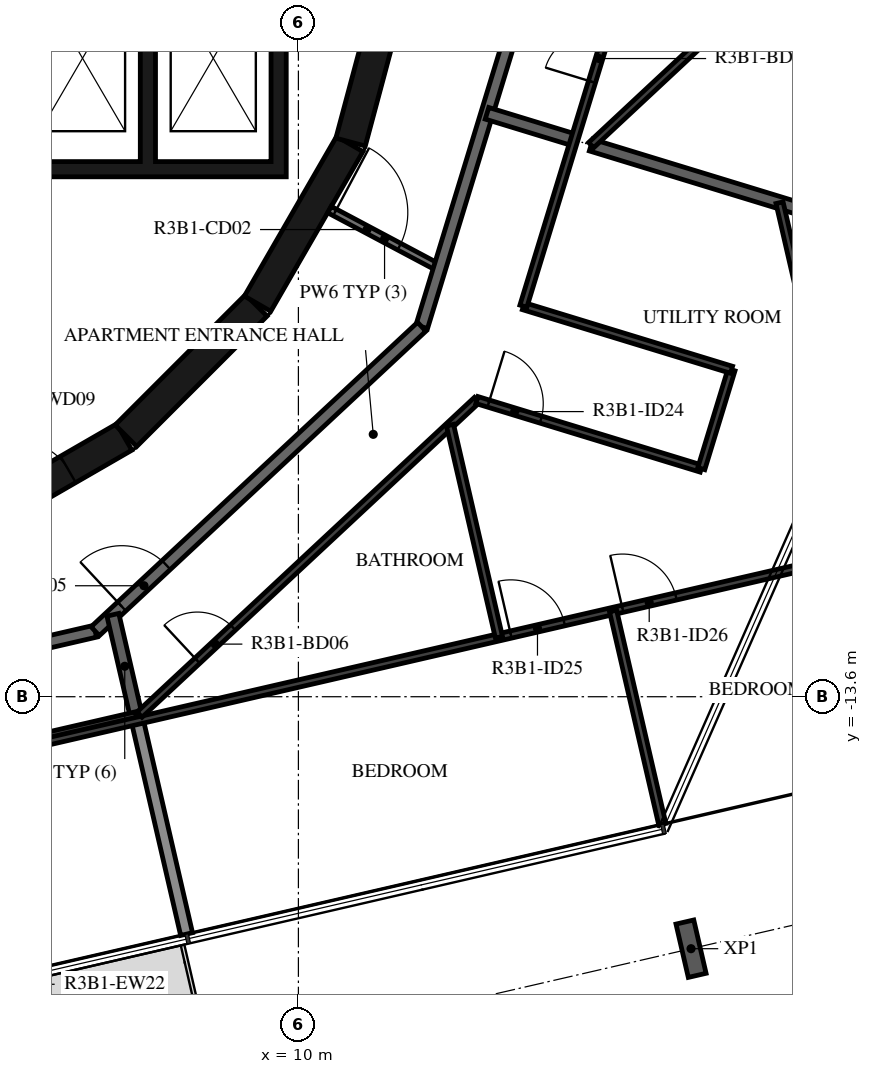
"""IFC4 building model, lengths in metres.
Left out: names, types, materials, properties, quantities, classifications, styles, units other than length and angle.
Written with IfcOpenShell. Run it as: python <this file> out.ifc"""

import sys

from ifc_helpers import new_model, si_unit, direction, frame, frame_2d, origin, origin_2d, place, context, subcontext, project, spatial, polyline, rectangle, i_section, outline, extrude, element, fill, save


model = new_model("IFC4")
c1 = context("Model", 3, precision=1e-05, world=origin(), true_north=direction((0.0, 1.0)))
c2 = subcontext(c1, "Body", "Model", "MODEL_VIEW")
j1 = project(units=[si_unit("LENGTHUNIT", "METRE"), si_unit("PLANEANGLEUNIT", "RADIAN")], contexts=[c1])
p1 = place(None, origin())
s1 = spatial("IfcSite", under=j1, at=p1, CompositionType="ELEMENT")
p2 = place(p1, origin())
s2 = spatial("IfcBuilding", under=s1, at=p2, CompositionType="ELEMENT")
p3 = place(p2, frame((0.0, 0.0, 123.9)))
s3 = spatial("IfcBuildingStorey", under=s2, at=p3, CompositionType="ELEMENT", Elevation=123.9)
p4 = place(p3, frame((16.457, -17.744, -0.38), z_axis=(0.0, 0.0, 1.0), x_axis=(-0.974370073419, -0.224951016948, 0.0)))
e1 = element("IfcColumn", 1, at=p4, inside=s3, PredefinedType="COLUMN", context=c2, shape_type="SweptSolid", body=[
    extrude(i_section(OverallWidth=0.3, OverallDepth=0.9, WebThickness=0.019, FlangeThickness=0.035, FilletRadius=0.03, at=origin_2d()), origin(), (0.0, 0.0, 1.0), 3.5),
])
p5 = place(p3, frame((4.51, -10.845, 0.0), z_axis=(0.0, 0.0, 1.0), x_axis=(0.865975092491, 0.500087131594, 0.0)))
e2 = element("IfcWall", 2, at=p5, inside=s3, PredefinedType="SHEAR", context=c2, shape_type="SweptSolid", body=[
    extrude(rectangle(XDim=3.033, YDim=0.5, at=frame_2d((1.516, 0.0))), origin(), (0.0, 0.0, 1.0), 3.12),
])
p6 = place(p5, frame((1.066, 0.0, 0.0)))
e3 = element("IfcOpeningElement", 3, at=p6, cuts=e2, PredefinedType="OPENING", context=c2, shape_type="SweptSolid", body=[
    extrude(rectangle(XDim=0.9, YDim=2.1, at=frame_2d((0.45, 1.05))), frame((0.0, 0.26, 0.0), z_axis=(0.0, -1.0, 0.0), x_axis=(1.0, 0.0, 0.0)), (0.0, 0.0, 1.0), 0.52),
])
p7 = place(p3, frame((7.164, -9.308, 0.0), z_axis=(0.0, 0.0, 1.0), x_axis=(0.707106781187, 0.707106781187, 0.0)))
e4 = element("IfcWall", 4, at=p7, inside=s3, PredefinedType="SHEAR", context=c2, shape_type="SweptSolid", body=[
    extrude(rectangle(XDim=3.032, YDim=0.5, at=frame_2d((1.516, 0.0))), origin(), (0.0, 0.0, 1.0), 3.12),
])
for number, where, z_axis, x_axis in (
    (5, (9.329, -7.137, 0.0), (0.0, 0.0, 1.0), (0.5, 0.866, 0.0)),
    (6, (10.858, -4.479, 0.0), (0.0, 0.0, 1.0), (0.259, 0.966, 0.0)),
):
    element("IfcWall", number, at=place(p3, frame(where, z_axis=z_axis, x_axis=x_axis)), inside=s3, PredefinedType="SHEAR", context=c2, shape_type="SweptSolid", body=[
        extrude(rectangle(XDim=3.033, YDim=0.5, at=frame_2d((1.516, 0.0))), origin(), (0.0, 0.0, 1.0), 3.12),
    ])
p8 = place(p3, origin())
e7 = element("IfcWall", 7, at=p8, inside=s3, PredefinedType="SHEAR", context=c2, shape_type="SweptSolid", body=[
    extrude(outline(polyline([(9.8, -5.05), (9.8, -4.8), (9.8, -1.9), (9.55, -1.9), (9.55, -4.8), (7.65, -4.8), (7.65, -1.9), (7.4, -1.9), (7.4, -4.8), (5.5, -4.8), (5.5, -1.9), (5.25, -1.9), (5.25, -4.8), (3.35, -4.8), (3.35, -1.9), (3.1, -1.9), (3.1, -4.8), (1.2, -4.8), (1.2, -1.9), (0.95, -1.9), (0.95, -4.8), (-0.95, -4.8), (-0.95, -1.9), (-1.2, -1.9), (-1.2, -4.8), (-5.25, -4.8), (-5.25, -1.9), (-5.5, -1.9), (-5.5, -4.8), (-7.4, -4.8), (-7.4, -1.9), (-7.65, -1.9), (-7.65, -4.8), (-9.55, -4.8), (-9.55, -1.9), (-9.8, -1.9), (-9.8, -4.8), (-9.8, -5.05), (9.8, -5.05)])), origin(), (0.0, 0.0, 1.0), 3.12),
])
p9 = place(p3, frame((10.511, -5.589, 0.0), z_axis=(0.0, 0.0, 1.0), x_axis=(0.882987820808, -0.469395897196, 0.0)))
e8 = element("IfcWall", 8, at=p9, inside=s3, PredefinedType="PARTITIONING", context=c2, shape_type="SweptSolid", body=[
    extrude(rectangle(XDim=2.052, YDim=0.12, at=frame_2d((1.026, 0.0))), origin(), (0.0, 0.0, 1.0), 3.12),
])
p10 = place(p9, frame((0.1, 0.0, 0.0)))
e9 = element("IfcOpeningElement", 9, at=p10, cuts=e8, PredefinedType="OPENING", context=c2, shape_type="SweptSolid", body=[
    extrude(rectangle(XDim=1.2, YDim=2.1, at=frame_2d((0.6, 1.05))), frame((0.0, 0.07, 0.0), z_axis=(0.0, -1.0, 0.0), x_axis=(1.0, 0.0, 0.0)), (0.0, 0.0, 1.0), 0.14),
])
p11 = place(p3, frame((12.028, -7.516, 0.0), z_axis=(0.0, 0.0, 1.0), x_axis=(0.292365533182, 0.956306642771, 0.0)))
e10 = element("IfcWall", 10, at=p11, inside=s3, PredefinedType="STANDARD", context=c2, shape_type="SweptSolid", body=[
    extrude(rectangle(XDim=7.342, YDim=0.2, at=frame_2d((3.671, 0.0))), origin(), (0.0, 0.0, 1.0), 3.12),
])
p12 = place(p3, frame((-0.495, -14.175, 0.0), z_axis=(0.0, 0.0, 1.0), x_axis=(0.974376622151, 0.224922649383, 0.0)))
e11 = element("IfcWall", 11, at=p12, inside=s3, PredefinedType="STANDARD", context=c2, shape_type="SweptSolid", body=[
    extrude(rectangle(XDim=7.342, YDim=0.2, at=frame_2d((3.671, 0.0))), origin(), (0.0, 0.0, 1.0), 3.12),
])
p13 = place(p3, frame((6.659, -12.523, 0.0), z_axis=(0.0, 0.0, 1.0), x_axis=(0.731350455479, 0.682001841105, 0.0)))
e12 = element("IfcWall", 12, at=p13, inside=s3, PredefinedType="STANDARD", context=c2, shape_type="SweptSolid", body=[
    extrude(rectangle(XDim=7.342, YDim=0.2, at=frame_2d((3.671, 0.0))), origin(), (0.0, 0.0, 1.0), 3.12),
])
p14 = place(p13, frame((0.597, 0.0, 0.0)))
e13 = element("IfcOpeningElement", 13, at=p14, cuts=e12, PredefinedType="OPENING", context=c2, shape_type="SweptSolid", body=[
    extrude(rectangle(XDim=1.0, YDim=2.1, at=frame_2d((0.5, 1.05))), frame((0.0, 0.11, 0.0), z_axis=(0.0, -1.0, 0.0), x_axis=(1.0, 0.0, 0.0)), (0.0, 0.0, 1.0), 0.22),
])
p15 = place(p3, frame((7.34, -13.946, 0.0), z_axis=(0.0, 0.0, 1.0), x_axis=(-0.224849249613, 0.974393562658, 0.0)))
e14 = element("IfcWall", 14, at=p15, inside=s3, PredefinedType="STANDARD", context=c2, shape_type="SweptSolid", body=[
    extrude(rectangle(XDim=1.738, YDim=0.2, at=frame_2d((0.869, 0.0))), origin(), (0.0, 0.0, 1.0), 3.12),
])
p16 = place(p3, frame((8.161, -17.504, 0.0), z_axis=(0.0, 0.0, 1.0), x_axis=(-0.224943703639, 0.9743717618, 0.0)))
e15 = element("IfcWall", 15, at=p16, inside=s3, PredefinedType="STANDARD", context=c2, shape_type="SweptSolid", body=[
    extrude(rectangle(XDim=3.6, YDim=0.2, at=frame_2d((1.8, 0.0))), origin(), (0.0, 0.0, 1.0), 2.73),
])
p17 = place(p3, frame((14.536, -4.444, 0.0), z_axis=(0.0, 0.0, 1.0), x_axis=(-0.956326299111, 0.292301230974, 0.0)))
e16 = element("IfcWall", 16, at=p17, inside=s3, PredefinedType="STANDARD", context=c2, shape_type="SweptSolid", body=[
    extrude(rectangle(XDim=1.5, YDim=0.2, at=frame_2d((0.75, 0.0))), origin(), (0.0, 0.0, 1.0), 3.12),
])
p18 = place(p3, frame((19.38, -5.925, 0.0), z_axis=(0.0, 0.0, 1.0), x_axis=(-0.956301542054, 0.29238221674, 0.0)))
e17 = element("IfcWall", 17, at=p18, inside=s3, PredefinedType="STANDARD", context=c2, shape_type="SweptSolid", body=[
    extrude(rectangle(XDim=4.775, YDim=0.2, at=frame_2d((2.387, 0.0))), origin(), (0.0, 0.0, 1.0), 3.12),
])
p19 = place(p3, frame((-0.549, -15.727, 0.0), z_axis=(0.0, 0.0, 1.0), x_axis=(0.97436829548, 0.224958717908, 0.0)))
e18 = element("IfcWall", 18, at=p19, inside=s3, PredefinedType="PARTITIONING", context=c2, shape_type="SweptSolid", body=[
    extrude(rectangle(XDim=8.087, YDim=0.12, at=frame_2d((4.044, 0.0))), origin(), (0.0, 0.0, 1.0), 3.12),
])
p20 = place(p3, frame((-13.939, -18.911, 0.0), z_axis=(0.0, 0.0, 1.0), x_axis=(0.974369607456, 0.224953035245, 0.0)))
e19 = element("IfcWall", 19, at=p20, inside=s3, PredefinedType="PARTITIONING", context=c2, shape_type="SweptSolid", body=[
    extrude(rectangle(XDim=33.934, YDim=0.12, at=frame_2d((16.967, 0.0))), origin(), (0.0, 0.0, 1.0), 3.12),
])
p21 = place(p20, frame((2.0, 0.0, 0.0)))
e20 = element("IfcOpeningElement", 20, at=p21, cuts=e19, PredefinedType="OPENING", context=c2, shape_type="SweptSolid", body=[
    extrude(rectangle(XDim=0.9, YDim=2.1, at=frame_2d((0.45, 1.05))), frame((0.0, 0.07, 0.0), z_axis=(0.0, -1.0, 0.0), x_axis=(1.0, 0.0, 0.0)), (0.0, 0.0, 1.0), 0.14),
])
p22 = place(p20, frame((28.154, 0.0, 0.0)))
e21 = element("IfcOpeningElement", 21, at=p22, cuts=e19, PredefinedType="OPENING", context=c2, shape_type="SweptSolid", body=[
    extrude(rectangle(XDim=0.9, YDim=2.1, at=frame_2d((0.45, 1.05))), frame((0.0, 0.07, 0.0), z_axis=(0.0, -1.0, 0.0), x_axis=(1.0, 0.0, 0.0)), (0.0, 0.0, 1.0), 0.14),
])
p23 = place(p20, frame((30.039, 0.0, 0.0)))
e22 = element("IfcOpeningElement", 22, at=p23, cuts=e19, PredefinedType="OPENING", context=c2, shape_type="SweptSolid", body=[
    extrude(rectangle(XDim=0.9, YDim=2.1, at=frame_2d((0.45, 1.05))), frame((0.0, 0.07, 0.0), z_axis=(0.0, -1.0, 0.0), x_axis=(1.0, 0.0, 0.0)), (0.0, 0.0, 1.0), 0.14),
])
p24 = place(p3, frame((7.388, -13.894, 0.0), z_axis=(0.0, 0.0, 1.0), x_axis=(0.731346321845, 0.682006273815, 0.0)))
e23 = element("IfcWall", 23, at=p24, inside=s3, PredefinedType="PARTITIONING", context=c2, shape_type="SweptSolid", body=[
    extrude(rectangle(XDim=7.585, YDim=0.12, at=frame_2d((3.793, 0.0))), origin(), (0.0, 0.0, 1.0), 3.12),
])
p25 = place(p24, frame((1.3, 0.0, 0.0)))
e24 = element("IfcOpeningElement", 24, at=p25, cuts=e23, PredefinedType="OPENING", context=c2, shape_type="SweptSolid", body=[
    extrude(rectangle(XDim=0.8, YDim=2.1, at=frame_2d((0.4, 1.05))), frame((0.0, 0.07, 0.0), z_axis=(0.0, -1.0, 0.0), x_axis=(1.0, 0.0, 0.0)), (0.0, 0.0, 1.0), 0.14),
])
p26 = place(p3, frame((12.935, -8.721, 0.0), z_axis=(0.0, 0.0, 1.0), x_axis=(0.956306865441, -0.292364804843, 0.0)))
e25 = element("IfcWall", 25, at=p26, inside=s3, PredefinedType="PARTITIONING", context=c2, shape_type="SweptSolid", body=[
    extrude(rectangle(XDim=3.859, YDim=0.12, at=frame_2d((1.929, 0.0))), origin(), (0.0, 0.0, 1.0), 3.12),
])
p27 = place(p26, frame((0.2, 0.0, 0.0)))
e26 = element("IfcOpeningElement", 26, at=p27, cuts=e25, PredefinedType="OPENING", context=c2, shape_type="SweptSolid", body=[
    extrude(rectangle(XDim=0.9, YDim=2.1, at=frame_2d((0.45, 1.05))), frame((0.0, 0.07, 0.0), z_axis=(0.0, -1.0, 0.0), x_axis=(1.0, 0.0, 0.0)), (0.0, 0.0, 1.0), 0.14),
])
p28 = place(p3, frame((16.625, -9.849, 0.0), z_axis=(0.0, 0.0, 1.0), x_axis=(0.292390011609, 0.956299158795, 0.0)))
e27 = element("IfcWall", 27, at=p28, inside=s3, PredefinedType="PARTITIONING", context=c2, shape_type="SweptSolid", body=[
    extrude(rectangle(XDim=1.7, YDim=0.12, at=frame_2d((0.85, 0.0))), origin(), (0.0, 0.0, 1.0), 3.12),
])
p29 = place(p3, frame((17.123, -8.223, 0.0), z_axis=(0.0, 0.0, 1.0), x_axis=(-0.956299657224, 0.292388381428, 0.0)))
e28 = element("IfcWall", 28, at=p29, inside=s3, PredefinedType="PARTITIONING", context=c2, shape_type="SweptSolid", body=[
    extrude(rectangle(XDim=3.579, YDim=0.12, at=frame_2d((1.79, 0.0))), origin(), (0.0, 0.0, 1.0), 3.12),
])
p30 = place(p3, frame((13.7, -7.177, 0.0), z_axis=(0.0, 0.0, 1.0), x_axis=(0.292382309758, 0.956301513614, 0.0)))
e29 = element("IfcWall", 29, at=p30, inside=s3, PredefinedType="PARTITIONING", context=c2, shape_type="SweptSolid", body=[
    extrude(rectangle(XDim=6.93, YDim=0.12, at=frame_2d((3.465, 0.0))), origin(), (0.0, 0.0, 1.0), 3.12),
])
p31 = place(p30, frame((3.858, 0.0, 0.0)))
e30 = element("IfcOpeningElement", 30, at=p31, cuts=e29, PredefinedType="OPENING", context=c2, shape_type="SweptSolid", body=[
    extrude(rectangle(XDim=0.8, YDim=2.1, at=frame_2d((0.4, 1.05))), frame((0.0, 0.07, 0.0), z_axis=(0.0, -1.0, 0.0), x_axis=(1.0, 0.0, 0.0)), (0.0, 0.0, 1.0), 0.14),
])
p32 = place(p3, frame((15.985, -15.698, 0.0), z_axis=(0.0, 0.0, 1.0), x_axis=(-0.224943703639, 0.9743717618, 0.0)))
e31 = element("IfcWall", 31, at=p32, inside=s3, PredefinedType="PARTITIONING", context=c2, shape_type="SweptSolid", body=[
    extrude(rectangle(XDim=3.6, YDim=0.12, at=frame_2d((1.8, 0.0))), origin(), (0.0, 0.0, 1.0), 2.73),
])
p33 = place(p3, frame((13.298, -12.623, 0.0), z_axis=(0.0, 0.0, 1.0), x_axis=(-0.22499394936, 0.974360160696, 0.0)))
e32 = element("IfcWall", 32, at=p33, inside=s3, PredefinedType="PARTITIONING", context=c2, shape_type="SweptSolid", body=[
    extrude(rectangle(XDim=3.581, YDim=0.12, at=frame_2d((1.791, 0.0))), origin(), (0.0, 0.0, 1.0), 3.12),
])
p34 = place(p3, frame((19.245, -11.25, 0.0), z_axis=(0.0, 0.0, 1.0), x_axis=(-0.224958805164, 0.974368275335, 0.0)))
e33 = element("IfcWall", 33, at=p34, inside=s3, PredefinedType="PARTITIONING", context=c2, shape_type="SweptSolid", body=[
    extrude(rectangle(XDim=5.926, YDim=0.12, at=frame_2d((2.963, 0.0))), origin(), (0.0, 0.0, 1.0), 3.12),
])
p35 = place(p34, frame((0.2, 0.0, 0.0)))
e34 = element("IfcOpeningElement", 34, at=p35, cuts=e33, PredefinedType="OPENING", context=c2, shape_type="SweptSolid", body=[
    extrude(rectangle(XDim=0.9, YDim=2.1, at=frame_2d((0.45, 1.05))), frame((0.0, 0.07, 0.0), z_axis=(0.0, -1.0, 0.0), x_axis=(1.0, 0.0, 0.0)), (0.0, 0.0, 1.0), 0.14),
])
p36 = place(p3, frame((18.577, -1.02, 0.0), z_axis=(0.0, 0.0, 1.0), x_axis=(-0.731348673524, -0.682003751994, 0.0)))
e35 = element("IfcWall", 35, at=p36, inside=s3, PredefinedType="PARTITIONING", context=c2, shape_type="SweptSolid", body=[
    extrude(rectangle(XDim=5.146, YDim=0.12, at=frame_2d((2.573, 0.0))), origin(), (0.0, 0.0, 1.0), 3.12),
])
p37 = place(p3, frame((22.054, -4.749, 0.0), z_axis=(0.0, 0.0, 1.0), x_axis=(-0.682014558945, 0.731338595582, 0.0)))
e36 = element("IfcWall", 36, at=p37, inside=s3, PredefinedType="PARTITIONING", context=c2, shape_type="SweptSolid", body=[
    extrude(rectangle(XDim=10.399, YDim=0.12, at=frame_2d((5.2, 0.0))), origin(), (0.0, 0.0, 1.0), 3.12),
])
p38 = place(p37, frame((0.8, 0.0, 0.0)))
e37 = element("IfcOpeningElement", 37, at=p38, cuts=e36, PredefinedType="OPENING", context=c2, shape_type="SweptSolid", body=[
    extrude(rectangle(XDim=0.9, YDim=2.1, at=frame_2d((0.45, 1.05))), frame((0.0, 0.07, 0.0), z_axis=(0.0, -1.0, 0.0), x_axis=(1.0, 0.0, 0.0)), (0.0, 0.0, 1.0), 0.14),
])
p39 = place(p6, origin())
e38 = element("IfcDoor", 38, at=p39, inside=s3, OperationType="SINGLE_SWING_RIGHT", PredefinedType="DOOR", context=c2, shape_type="SweptSolid", body=[
    extrude(rectangle(XDim=0.9, YDim=2.1, at=frame_2d((0.45, 1.05))), frame((0.0, 0.025, 0.0), z_axis=(0.0, -1.0, 0.0), x_axis=(1.0, 0.0, 0.0)), (0.0, 0.0, 1.0), 0.05),
])
fill(e3, e38)
p40 = place(p14, origin())
e39 = element("IfcDoor", 39, at=p40, inside=s3, OperationType="SINGLE_SWING_RIGHT", PredefinedType="DOOR", context=c2, shape_type="SweptSolid", body=[
    extrude(rectangle(XDim=1.0, YDim=2.1, at=frame_2d((0.5, 1.05))), frame((0.0, 0.025, 0.0), z_axis=(0.0, -1.0, 0.0), x_axis=(1.0, 0.0, 0.0)), (0.0, 0.0, 1.0), 0.05),
])
fill(e13, e39)
p41 = place(p25, origin())
e40 = element("IfcDoor", 40, at=p41, inside=s3, OperationType="SINGLE_SWING_RIGHT", PredefinedType="DOOR", context=c2, shape_type="SweptSolid", body=[
    extrude(rectangle(XDim=0.8, YDim=2.1, at=frame_2d((0.4, 1.05))), frame((0.0, 0.025, 0.0), z_axis=(0.0, -1.0, 0.0), x_axis=(1.0, 0.0, 0.0)), (0.0, 0.0, 1.0), 0.05),
])
fill(e24, e40)
p42 = place(p27, origin())
e41 = element("IfcDoor", 41, at=p42, inside=s3, OperationType="SINGLE_SWING_RIGHT", PredefinedType="DOOR", context=c2, shape_type="SweptSolid", body=[
    extrude(rectangle(XDim=0.9, YDim=2.1, at=frame_2d((0.45, 1.05))), frame((0.0, 0.025, 0.0), z_axis=(0.0, -1.0, 0.0), x_axis=(1.0, 0.0, 0.0)), (0.0, 0.0, 1.0), 0.05),
])
fill(e26, e41)
p43 = place(p22, origin())
e42 = element("IfcDoor", 42, at=p43, inside=s3, OperationType="SINGLE_SWING_RIGHT", PredefinedType="DOOR", context=c2, shape_type="SweptSolid", body=[
    extrude(rectangle(XDim=0.9, YDim=2.1, at=frame_2d((0.45, 1.05))), frame((0.0, 0.025, 0.0), z_axis=(0.0, -1.0, 0.0), x_axis=(1.0, 0.0, 0.0)), (0.0, 0.0, 1.0), 0.05),
])
fill(e21, e42)
p44 = place(p23, origin())
e43 = element("IfcDoor", 43, at=p44, inside=s3, OperationType="SINGLE_SWING_RIGHT", PredefinedType="DOOR", context=c2, shape_type="SweptSolid", body=[
    extrude(rectangle(XDim=0.9, YDim=2.1, at=frame_2d((0.45, 1.05))), frame((0.0, 0.025, 0.0), z_axis=(0.0, -1.0, 0.0), x_axis=(1.0, 0.0, 0.0)), (0.0, 0.0, 1.0), 0.05),
])
fill(e22, e43)
p45 = place(p31, origin())
e44 = element("IfcDoor", 44, at=p45, inside=s3, OperationType="SINGLE_SWING_LEFT", PredefinedType="DOOR", context=c2, shape_type="SweptSolid", body=[
    extrude(rectangle(XDim=0.8, YDim=2.1, at=frame_2d((0.4, 1.05))), frame((0.0, 0.025, 0.0), z_axis=(0.0, -1.0, 0.0), x_axis=(1.0, 0.0, 0.0)), (0.0, 0.0, 1.0), 0.05),
])
fill(e30, e44)
p46 = place(p10, origin())
e45 = element("IfcDoor", 45, at=p46, inside=s3, OperationType="DOUBLE_DOOR_SINGLE_SWING", PredefinedType="DOOR", context=c2, shape_type="SweptSolid", body=[
    extrude(rectangle(XDim=1.2, YDim=2.1, at=frame_2d((0.6, 1.05))), frame((0.0, 0.025, 0.0), z_axis=(0.0, -1.0, 0.0), x_axis=(1.0, 0.0, 0.0)), (0.0, 0.0, 1.0), 0.05),
])
fill(e9, e45)
save(model, sys.argv[1])
